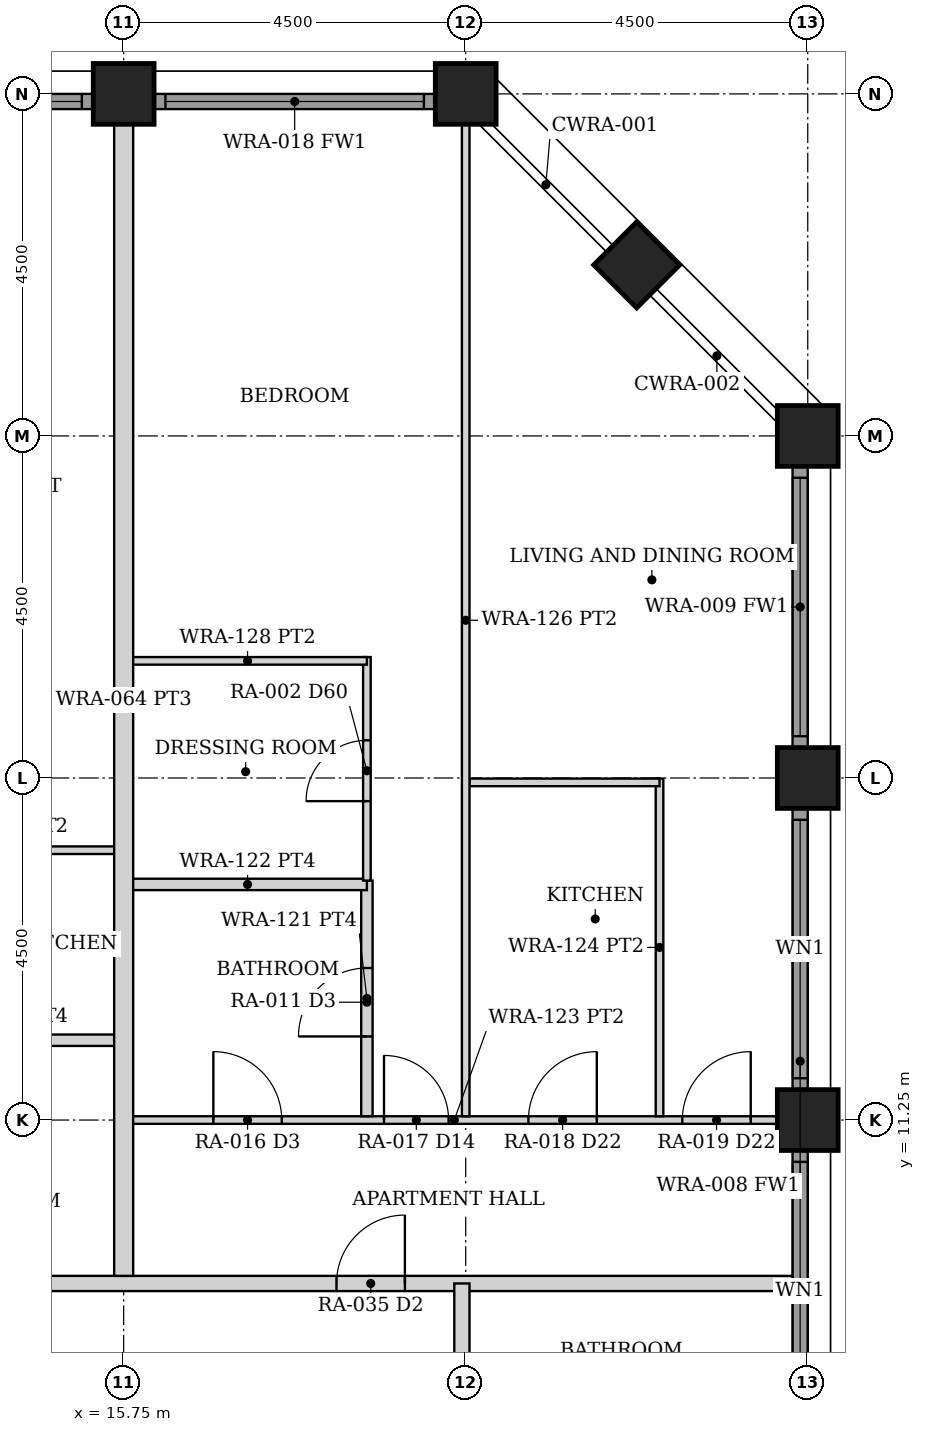
"""IFC4 building model, lengths in metres.
Left out: names, types, materials, properties, quantities, classifications, styles, units other than length and angle.
Written with IfcOpenShell. Run it as: python <this file> out.ifc"""

import sys

from ifc_helpers import new_model, si_unit, direction, frame, frame_2d, origin, origin_2d, place, context, subcontext, project, spatial, rectangle, hollow_rectangle, extrude, element, fill, save


model = new_model("IFC4")
c1 = context("Model", 3, precision=1e-05, world=origin(), true_north=direction((0.0, 1.0)))
c2 = subcontext(c1, "Body", "Model", "MODEL_VIEW")
j1 = project(units=[si_unit("LENGTHUNIT", "METRE"), si_unit("PLANEANGLEUNIT", "RADIAN")], contexts=[c1])
p1 = place(None, origin())
s1 = spatial("IfcSite", under=j1, at=p1, CompositionType="ELEMENT")
p2 = place(p1, origin())
s2 = spatial("IfcBuilding", under=s1, at=p2, CompositionType="ELEMENT")
p3 = place(p2, frame((0.0, 0.0, 30.0)))
s3 = spatial("IfcBuildingStorey", under=s2, at=p3, CompositionType="ELEMENT", Elevation=30.0)
for number, where, z_axis, x_axis in (
    (1, (24.75, 11.25, 0.0), (0.0, 0.0, 1.0), (1.0, 0.0, 0.0)),
    (2, (15.75, 24.75, 0.0), (0.0, 0.0, 1.0), (0.0, 1.0, 0.0)),
    (3, (24.75, 15.75, 0.0), (0.0, 0.0, 1.0), (1.0, 0.0, 0.0)),
    (4, (20.25, 24.75, 0.0), (0.0, 0.0, 1.0), (0.0, 1.0, 0.0)),
    (5, (24.75, 20.25, 0.0), (0.0, 0.0, 1.0), (1.0, 0.0, 0.0)),
    (6, (22.5, 22.5, 0.0), (0.0, 0.0, 1.0), (0.707, 0.707, 0.0)),
):
    element("IfcColumn", number, at=place(p3, frame(where, z_axis=z_axis, x_axis=x_axis)), inside=s3, PredefinedType="COLUMN", context=c2, shape_type="SweptSolid", body=[
        extrude(hollow_rectangle(XDim=0.8, YDim=0.8, WallThickness=0.08, at=origin_2d()), origin(), (0.0, 0.0, 1.0), 3.5),
    ])
p4 = place(p3, frame((24.65, 7.155, 0.0), z_axis=(0.0, 0.0, 1.0), x_axis=(0.0, 1.0, 0.0)))
e7 = element("IfcWall", 7, at=p4, inside=s3, PredefinedType="SOLIDWALL", context=c2, shape_type="SweptSolid", body=[
    extrude(rectangle(XDim=3.69, YDim=0.2, at=frame_2d((1.845, 0.0))), origin(), (0.0, 0.0, 1.0), 2.379),
])
p5 = place(p4, frame((0.145, 0.0, 0.3)))
e8 = element("IfcOpeningElement", 8, at=p5, cuts=e7, PredefinedType="OPENING", context=c2, shape_type="SweptSolid", body=[
    extrude(rectangle(XDim=3.4, YDim=1.929, at=frame_2d((1.7, 0.964))), frame((0.0, 0.11, 0.0), z_axis=(0.0, -1.0, 0.0), x_axis=(1.0, 0.0, 0.0)), (0.0, 0.0, 1.0), 0.22),
])
p6 = place(p3, frame((24.65, 11.655, 0.0), z_axis=(0.0, 0.0, 1.0), x_axis=(0.0, 1.0, 0.0)))
e9 = element("IfcWall", 9, at=p6, inside=s3, PredefinedType="SOLIDWALL", context=c2, shape_type="SweptSolid", body=[
    extrude(rectangle(XDim=3.69, YDim=0.2, at=frame_2d((1.845, 0.0))), origin(), (0.0, 0.0, 1.0), 2.379),
])
p7 = place(p6, frame((0.145, 0.0, 0.3)))
e10 = element("IfcOpeningElement", 10, at=p7, cuts=e9, PredefinedType="OPENING", context=c2, shape_type="SweptSolid", body=[
    extrude(rectangle(XDim=3.4, YDim=1.929, at=frame_2d((1.7, 0.964))), frame((0.0, 0.11, 0.0), z_axis=(0.0, -1.0, 0.0), x_axis=(1.0, 0.0, 0.0)), (0.0, 0.0, 1.0), 0.22),
])
p8 = place(p3, frame((24.65, 16.155, 0.0), z_axis=(0.0, 0.0, 1.0), x_axis=(0.0, 1.0, 0.0)))
e11 = element("IfcWall", 11, at=p8, inside=s3, PredefinedType="SOLIDWALL", context=c2, shape_type="SweptSolid", body=[
    extrude(rectangle(XDim=3.69, YDim=0.2, at=frame_2d((1.845, 0.0))), origin(), (0.0, 0.0, 1.0), 2.379),
])
p9 = place(p8, frame((0.145, 0.0, 0.3)))
e12 = element("IfcOpeningElement", 12, at=p9, cuts=e11, PredefinedType="OPENING", context=c2, shape_type="SweptSolid", body=[
    extrude(rectangle(XDim=3.4, YDim=1.929, at=frame_2d((1.7, 0.964))), frame((0.0, 0.11, 0.0), z_axis=(0.0, -1.0, 0.0), x_axis=(1.0, 0.0, 0.0)), (0.0, 0.0, 1.0), 0.22),
])
p10 = place(p3, frame((11.655, 24.65, 0.0), z_axis=(0.0, 0.0, 1.0), x_axis=(1.0, 0.0, 0.0)))
e13 = element("IfcWall", 13, at=p10, inside=s3, PredefinedType="SOLIDWALL", context=c2, shape_type="SweptSolid", body=[
    extrude(rectangle(XDim=3.69, YDim=0.2, at=frame_2d((1.845, 0.0))), origin(), (0.0, 0.0, 1.0), 2.379),
])
p11 = place(p10, frame((0.145, 0.0, 0.3)))
e14 = element("IfcOpeningElement", 14, at=p11, cuts=e13, PredefinedType="OPENING", context=c2, shape_type="SweptSolid", body=[
    extrude(rectangle(XDim=3.4, YDim=1.929, at=frame_2d((1.7, 0.964))), frame((0.0, 0.11, 0.0), z_axis=(0.0, -1.0, 0.0), x_axis=(1.0, 0.0, 0.0)), (0.0, 0.0, 1.0), 0.22),
])
p12 = place(p3, frame((16.155, 24.65, 0.0), z_axis=(0.0, 0.0, 1.0), x_axis=(1.0, 0.0, 0.0)))
e15 = element("IfcWall", 15, at=p12, inside=s3, PredefinedType="SOLIDWALL", context=c2, shape_type="SweptSolid", body=[
    extrude(rectangle(XDim=3.69, YDim=0.2, at=frame_2d((1.845, 0.0))), origin(), (0.0, 0.0, 1.0), 2.379),
])
p13 = place(p12, frame((0.145, 0.0, 0.3)))
e16 = element("IfcOpeningElement", 16, at=p13, cuts=e15, PredefinedType="OPENING", context=c2, shape_type="SweptSolid", body=[
    extrude(rectangle(XDim=3.4, YDim=1.929, at=frame_2d((1.7, 0.964))), frame((0.0, 0.11, 0.0), z_axis=(0.0, -1.0, 0.0), x_axis=(1.0, 0.0, 0.0)), (0.0, 0.0, 1.0), 0.22),
])
p14 = place(p3, frame((-24.55, 9.1, 0.0), z_axis=(0.0, 0.0, 1.0), x_axis=(1.0, 0.0, 0.0)))
e17 = element("IfcWall", 17, at=p14, inside=s3, PredefinedType="PARTITIONING", context=c2, shape_type="SweptSolid", body=[
    extrude(rectangle(XDim=49.1, YDim=0.2, at=frame_2d((24.55, 0.0))), origin(), (0.0, 0.0, 1.0), 2.373),
])
p15 = place(p14, frame((5.1, 0.0, 0.0)))
e18 = element("IfcOpeningElement", 18, at=p15, cuts=e17, PredefinedType="OPENING", context=c2, shape_type="SweptSolid", body=[
    extrude(rectangle(XDim=0.9, YDim=2.1, at=frame_2d((0.45, 1.05))), frame((0.0, 0.11, 0.0), z_axis=(0.0, -1.0, 0.0), x_axis=(1.0, 0.0, 0.0)), (0.0, 0.0, 1.0), 0.22),
])
p16 = place(p14, frame((9.0, 0.0, 0.0)))
e19 = element("IfcOpeningElement", 19, at=p16, cuts=e17, PredefinedType="OPENING", context=c2, shape_type="SweptSolid", body=[
    extrude(rectangle(XDim=0.9, YDim=2.1, at=frame_2d((0.45, 1.05))), frame((0.0, 0.11, 0.0), z_axis=(0.0, -1.0, 0.0), x_axis=(1.0, 0.0, 0.0)), (0.0, 0.0, 1.0), 0.22),
])
p17 = place(p14, frame((13.5, 0.0, 0.0)))
e20 = element("IfcOpeningElement", 20, at=p17, cuts=e17, PredefinedType="OPENING", context=c2, shape_type="SweptSolid", body=[
    extrude(rectangle(XDim=0.9, YDim=2.1, at=frame_2d((0.45, 1.05))), frame((0.0, 0.11, 0.0), z_axis=(0.0, -1.0, 0.0), x_axis=(1.0, 0.0, 0.0)), (0.0, 0.0, 1.0), 0.22),
])
p18 = place(p14, frame((18.0, 0.0, 0.0)))
e21 = element("IfcOpeningElement", 21, at=p18, cuts=e17, PredefinedType="OPENING", context=c2, shape_type="SweptSolid", body=[
    extrude(rectangle(XDim=0.9, YDim=2.1, at=frame_2d((0.45, 1.05))), frame((0.0, 0.11, 0.0), z_axis=(0.0, -1.0, 0.0), x_axis=(1.0, 0.0, 0.0)), (0.0, 0.0, 1.0), 0.22),
])
p19 = place(p14, frame((22.5, 0.0, 0.0)))
e22 = element("IfcOpeningElement", 22, at=p19, cuts=e17, PredefinedType="OPENING", context=c2, shape_type="SweptSolid", body=[
    extrude(rectangle(XDim=0.9, YDim=2.1, at=frame_2d((0.45, 1.05))), frame((0.0, 0.11, 0.0), z_axis=(0.0, -1.0, 0.0), x_axis=(1.0, 0.0, 0.0)), (0.0, 0.0, 1.0), 0.22),
])
p20 = place(p14, frame((27.0, 0.0, 0.0)))
e23 = element("IfcOpeningElement", 23, at=p20, cuts=e17, PredefinedType="OPENING", context=c2, shape_type="SweptSolid", body=[
    extrude(rectangle(XDim=0.9, YDim=2.1, at=frame_2d((0.45, 1.05))), frame((0.0, 0.11, 0.0), z_axis=(0.0, -1.0, 0.0), x_axis=(1.0, 0.0, 0.0)), (0.0, 0.0, 1.0), 0.22),
])
p21 = place(p14, frame((31.5, 0.0, 0.0)))
e24 = element("IfcOpeningElement", 24, at=p21, cuts=e17, PredefinedType="OPENING", context=c2, shape_type="SweptSolid", body=[
    extrude(rectangle(XDim=0.9, YDim=2.1, at=frame_2d((0.45, 1.05))), frame((0.0, 0.11, 0.0), z_axis=(0.0, -1.0, 0.0), x_axis=(1.0, 0.0, 0.0)), (0.0, 0.0, 1.0), 0.22),
])
p22 = place(p14, frame((36.0, 0.0, 0.0)))
e25 = element("IfcOpeningElement", 25, at=p22, cuts=e17, PredefinedType="OPENING", context=c2, shape_type="SweptSolid", body=[
    extrude(rectangle(XDim=0.9, YDim=2.1, at=frame_2d((0.45, 1.05))), frame((0.0, 0.11, 0.0), z_axis=(0.0, -1.0, 0.0), x_axis=(1.0, 0.0, 0.0)), (0.0, 0.0, 1.0), 0.22),
])
p23 = place(p14, frame((43.1, 0.0, 0.0)))
e26 = element("IfcOpeningElement", 26, at=p23, cuts=e17, PredefinedType="OPENING", context=c2, shape_type="SweptSolid", body=[
    extrude(rectangle(XDim=0.9, YDim=2.1, at=frame_2d((0.45, 1.05))), frame((0.0, 0.11, 0.0), z_axis=(0.0, -1.0, 0.0), x_axis=(1.0, 0.0, 0.0)), (0.0, 0.0, 1.0), 0.22),
])
p24 = place(p3, frame((20.2, -9.1, 0.0), z_axis=(0.0, 0.0, 1.0), x_axis=(0.0, 1.0, 0.0)))
e27 = element("IfcWall", 27, at=p24, inside=s3, PredefinedType="PARTITIONING", context=c2, shape_type="SweptSolid", body=[
    extrude(rectangle(XDim=18.2, YDim=0.2, at=frame_2d((9.1, 0.0))), origin(), (0.0, 0.0, 1.0), 2.373),
])
p25 = place(p24, frame((6.4, 0.0, 0.0)))
e28 = element("IfcOpeningElement", 28, at=p25, cuts=e27, PredefinedType="OPENING", context=c2, shape_type="SweptSolid", body=[
    extrude(rectangle(XDim=0.9, YDim=2.1, at=frame_2d((0.45, 1.05))), frame((0.0, 0.11, 0.0), z_axis=(0.0, -1.0, 0.0), x_axis=(1.0, 0.0, 0.0)), (0.0, 0.0, 1.0), 0.22),
])
p26 = place(p3, frame((12.6, 12.3, 0.0), z_axis=(0.0, 0.0, 1.0), x_axis=(1.0, 0.0, 0.0)))
e29 = element("IfcWall", 29, at=p26, inside=s3, PredefinedType="PARTITIONING", context=c2, shape_type="SweptSolid", body=[
    extrude(rectangle(XDim=3.05, YDim=0.15, at=frame_2d((1.525, 0.0))), origin(), (0.0, 0.0, 1.0), 2.373),
])
p27 = place(p3, frame((12.6, 14.8, 0.0), z_axis=(0.0, 0.0, 1.0), x_axis=(1.0, 0.0, 0.0)))
e30 = element("IfcWall", 30, at=p27, inside=s3, PredefinedType="PARTITIONING", context=c2, shape_type="SweptSolid", body=[
    extrude(rectangle(XDim=3.05, YDim=0.1, at=frame_2d((1.525, 0.0))), origin(), (0.0, 0.0, 1.0), 2.373),
])
p28 = place(p3, frame((15.85, 11.25, 0.0), z_axis=(0.0, 0.0, 1.0), x_axis=(1.0, 0.0, 0.0)))
e31 = element("IfcWall", 31, at=p28, inside=s3, PredefinedType="PARTITIONING", context=c2, shape_type="SweptSolid", body=[
    extrude(rectangle(XDim=8.5, YDim=0.1, at=frame_2d((4.25, 0.0))), origin(), (0.0, 0.0, 1.0), 2.373),
])
p29 = place(p28, frame((5.225, 0.0, 0.0)))
e32 = element("IfcOpeningElement", 32, at=p29, cuts=e31, PredefinedType="OPENING", context=c2, shape_type="SweptSolid", body=[
    extrude(rectangle(XDim=0.9, YDim=2.1, at=frame_2d((0.45, 1.05))), frame((0.0, 0.06, 0.0), z_axis=(0.0, -1.0, 0.0), x_axis=(1.0, 0.0, 0.0)), (0.0, 0.0, 1.0), 0.12),
])
p30 = place(p28, frame((7.25, 0.0, 0.0)))
e33 = element("IfcOpeningElement", 33, at=p30, cuts=e31, PredefinedType="OPENING", context=c2, shape_type="SweptSolid", body=[
    extrude(rectangle(XDim=0.9, YDim=2.1, at=frame_2d((0.45, 1.05))), frame((0.0, 0.06, 0.0), z_axis=(0.0, -1.0, 0.0), x_axis=(1.0, 0.0, 0.0)), (0.0, 0.0, 1.0), 0.12),
])
p31 = place(p28, frame((3.325, 0.0, 0.0)))
e34 = element("IfcOpeningElement", 34, at=p31, cuts=e31, PredefinedType="OPENING", context=c2, shape_type="SweptSolid", body=[
    extrude(rectangle(XDim=0.85, YDim=2.1, at=frame_2d((0.425, 1.05))), frame((0.0, 0.06, 0.0), z_axis=(0.0, -1.0, 0.0), x_axis=(1.0, 0.0, 0.0)), (0.0, 0.0, 1.0), 0.12),
])
p32 = place(p28, frame((1.08, 0.0, 0.0)))
e35 = element("IfcOpeningElement", 35, at=p32, cuts=e31, PredefinedType="OPENING", context=c2, shape_type="SweptSolid", body=[
    extrude(rectangle(XDim=0.9, YDim=2.1, at=frame_2d((0.45, 1.05))), frame((0.0, 0.06, 0.0), z_axis=(0.0, -1.0, 0.0), x_axis=(1.0, 0.0, 0.0)), (0.0, 0.0, 1.0), 0.12),
])
p33 = place(p3, frame((22.8, 11.3, 0.0), z_axis=(0.0, 0.0, 1.0), x_axis=(0.0, 1.0, 0.0)))
e36 = element("IfcWall", 36, at=p33, inside=s3, PredefinedType="PARTITIONING", context=c2, shape_type="SweptSolid", body=[
    extrude(rectangle(XDim=4.442, YDim=0.1, at=frame_2d((2.221, 0.0))), origin(), (0.0, 0.0, 1.0), 2.373),
])
p34 = place(p3, frame((20.3, 15.692, 0.0), z_axis=(0.0, 0.0, 1.0), x_axis=(1.0, 0.0, 0.0)))
e37 = element("IfcWall", 37, at=p34, inside=s3, PredefinedType="PARTITIONING", context=c2, shape_type="SweptSolid", body=[
    extrude(rectangle(XDim=2.5, YDim=0.1, at=frame_2d((1.25, 0.0))), origin(), (0.0, 0.0, 1.0), 2.373),
])
p35 = place(p3, frame((20.25, 11.3, 0.0), z_axis=(0.0, 0.0, 1.0), x_axis=(0.0, 1.0, 0.0)))
e38 = element("IfcWall", 38, at=p35, inside=s3, PredefinedType="PARTITIONING", context=c2, shape_type="SweptSolid", body=[
    extrude(rectangle(XDim=13.05, YDim=0.1, at=frame_2d((6.525, 0.0))), origin(), (0.0, 0.0, 1.0), 2.373),
])
p36 = place(p3, frame((18.95, 11.3, 0.0), z_axis=(0.0, 0.0, 1.0), x_axis=(0.0, 1.0, 0.0)))
e39 = element("IfcWall", 39, at=p36, inside=s3, PredefinedType="PARTITIONING", context=c2, shape_type="SweptSolid", body=[
    extrude(rectangle(XDim=3.1, YDim=0.15, at=frame_2d((1.55, 0.0))), origin(), (0.0, 0.0, 1.0), 2.373),
])
p37 = place(p36, frame((1.05, 0.0, 0.0)))
e40 = element("IfcOpeningElement", 40, at=p37, cuts=e39, PredefinedType="OPENING", context=c2, shape_type="SweptSolid", body=[
    extrude(rectangle(XDim=0.9, YDim=2.1, at=frame_2d((0.45, 1.05))), frame((0.0, 0.085, 0.0), z_axis=(0.0, -1.0, 0.0), x_axis=(1.0, 0.0, 0.0)), (0.0, 0.0, 1.0), 0.17),
])
p38 = place(p3, frame((15.81, 14.35, 0.0), z_axis=(0.0, 0.0, 1.0), x_axis=(1.0, 0.0, 0.0)))
e41 = element("IfcWall", 41, at=p38, inside=s3, PredefinedType="PARTITIONING", context=c2, shape_type="SweptSolid", body=[
    extrude(rectangle(XDim=3.14, YDim=0.15, at=frame_2d((1.57, 0.0))), origin(), (0.0, 0.0, 1.0), 2.373),
])
p39 = place(p3, frame((18.95, 14.4, 0.0), z_axis=(0.0, 0.0, 1.0), x_axis=(0.0, 1.0, 0.0)))
e42 = element("IfcWall", 42, at=p39, inside=s3, PredefinedType="PARTITIONING", context=c2, shape_type="SweptSolid", body=[
    extrude(rectangle(XDim=2.941, YDim=0.1, at=frame_2d((1.47, 0.0))), origin(), (0.0, 0.0, 1.0), 2.373),
])
p40 = place(p39, frame((1.045, 0.0, 0.0)))
e43 = element("IfcOpeningElement", 43, at=p40, cuts=e42, PredefinedType="OPENING", context=c2, shape_type="SweptSolid", body=[
    extrude(rectangle(XDim=0.8, YDim=2.1, at=frame_2d((0.4, 1.05))), frame((0.0, 0.06, 0.0), z_axis=(0.0, -1.0, 0.0), x_axis=(1.0, 0.0, 0.0)), (0.0, 0.0, 1.0), 0.12),
])
p41 = place(p3, frame((15.81, 17.291, 0.0), z_axis=(0.0, 0.0, 1.0), x_axis=(1.0, 0.0, 0.0)))
e44 = element("IfcWall", 44, at=p41, inside=s3, PredefinedType="PARTITIONING", context=c2, shape_type="SweptSolid", body=[
    extrude(rectangle(XDim=3.14, YDim=0.1, at=frame_2d((1.57, 0.0))), origin(), (0.0, 0.0, 1.0), 2.373),
])
p42 = place(p3, frame((15.75, 9.2, 0.0), z_axis=(0.0, 0.0, 1.0), x_axis=(0.0, 1.0, 0.0)))
e45 = element("IfcWall", 45, at=p42, inside=s3, PredefinedType="PARTITIONING", context=c2, shape_type="SweptSolid", body=[
    extrude(rectangle(XDim=15.15, YDim=0.25, at=frame_2d((7.575, 0.0))), origin(), (0.0, 0.0, 1.0), 2.373),
])
p43 = place(p5, origin())
e46 = element("IfcWindow", 46, at=p43, inside=s3, PartitioningType="SINGLE_PANEL", PredefinedType="WINDOW", context=c2, shape_type="SweptSolid", body=[
    extrude(rectangle(XDim=3.4, YDim=1.929, at=frame_2d((1.7, 0.964))), frame((0.0, 0.03, 0.0), z_axis=(0.0, -1.0, 0.0), x_axis=(1.0, 0.0, 0.0)), (0.0, 0.0, 1.0), 0.06),
])
fill(e8, e46)
p44 = place(p7, origin())
e47 = element("IfcWindow", 47, at=p44, inside=s3, PartitioningType="SINGLE_PANEL", PredefinedType="WINDOW", context=c2, shape_type="SweptSolid", body=[
    extrude(rectangle(XDim=3.4, YDim=1.929, at=frame_2d((1.7, 0.964))), frame((0.0, 0.03, 0.0), z_axis=(0.0, -1.0, 0.0), x_axis=(1.0, 0.0, 0.0)), (0.0, 0.0, 1.0), 0.06),
])
fill(e10, e47)
p45 = place(p9, origin())
e48 = element("IfcWindow", 48, at=p45, inside=s3, PartitioningType="SINGLE_PANEL", PredefinedType="WINDOW", context=c2, shape_type="SweptSolid", body=[
    extrude(rectangle(XDim=3.4, YDim=1.929, at=frame_2d((1.7, 0.964))), frame((0.0, 0.03, 0.0), z_axis=(0.0, -1.0, 0.0), x_axis=(1.0, 0.0, 0.0)), (0.0, 0.0, 1.0), 0.06),
])
fill(e12, e48)
p46 = place(p11, origin())
e49 = element("IfcWindow", 49, at=p46, inside=s3, PartitioningType="SINGLE_PANEL", PredefinedType="WINDOW", context=c2, shape_type="SweptSolid", body=[
    extrude(rectangle(XDim=3.4, YDim=1.929, at=frame_2d((1.7, 0.964))), frame((0.0, 0.03, 0.0), z_axis=(0.0, -1.0, 0.0), x_axis=(1.0, 0.0, 0.0)), (0.0, 0.0, 1.0), 0.06),
])
fill(e14, e49)
p47 = place(p13, origin())
e50 = element("IfcWindow", 50, at=p47, inside=s3, PartitioningType="SINGLE_PANEL", PredefinedType="WINDOW", context=c2, shape_type="SweptSolid", body=[
    extrude(rectangle(XDim=3.4, YDim=1.929, at=frame_2d((1.7, 0.964))), frame((0.0, 0.03, 0.0), z_axis=(0.0, -1.0, 0.0), x_axis=(1.0, 0.0, 0.0)), (0.0, 0.0, 1.0), 0.06),
])
fill(e16, e50)
p48 = place(p23, origin())
e51 = element("IfcDoor", 51, at=p48, inside=s3, OperationType="SINGLE_SWING_RIGHT", PredefinedType="DOOR", context=c2, shape_type="SweptSolid", body=[
    extrude(rectangle(XDim=0.9, YDim=2.1, at=frame_2d((0.45, 1.05))), frame((0.0, 0.025, 0.0), z_axis=(0.0, -1.0, 0.0), x_axis=(1.0, 0.0, 0.0)), (0.0, 0.0, 1.0), 0.05),
])
fill(e26, e51)
p49 = place(p29, origin())
e52 = element("IfcDoor", 52, at=p49, inside=s3, OperationType="SINGLE_SWING_RIGHT", PredefinedType="DOOR", context=c2, shape_type="SweptSolid", body=[
    extrude(rectangle(XDim=0.9, YDim=2.1, at=frame_2d((0.45, 1.05))), frame((0.0, 0.025, 0.0), z_axis=(0.0, -1.0, 0.0), x_axis=(1.0, 0.0, 0.0)), (0.0, 0.0, 1.0), 0.05),
])
fill(e32, e52)
p50 = place(p30, origin())
e53 = element("IfcDoor", 53, at=p50, inside=s3, OperationType="SINGLE_SWING_RIGHT", PredefinedType="DOOR", context=c2, shape_type="SweptSolid", body=[
    extrude(rectangle(XDim=0.9, YDim=2.1, at=frame_2d((0.45, 1.05))), frame((0.0, 0.025, 0.0), z_axis=(0.0, -1.0, 0.0), x_axis=(1.0, 0.0, 0.0)), (0.0, 0.0, 1.0), 0.05),
])
fill(e33, e53)
p51 = place(p31, origin())
e54 = element("IfcDoor", 54, at=p51, inside=s3, OperationType="SINGLE_SWING_LEFT", PredefinedType="DOOR", context=c2, shape_type="SweptSolid", body=[
    extrude(rectangle(XDim=0.85, YDim=2.1, at=frame_2d((0.425, 1.05))), frame((0.0, 0.025, 0.0), z_axis=(0.0, -1.0, 0.0), x_axis=(1.0, 0.0, 0.0)), (0.0, 0.0, 1.0), 0.05),
])
fill(e34, e54)
p52 = place(p37, origin())
e55 = element("IfcDoor", 55, at=p52, inside=s3, OperationType="SINGLE_SWING_LEFT", PredefinedType="DOOR", context=c2, shape_type="SweptSolid", body=[
    extrude(rectangle(XDim=0.9, YDim=2.1, at=frame_2d((0.45, 1.05))), frame((0.0, 0.025, 0.0), z_axis=(0.0, -1.0, 0.0), x_axis=(1.0, 0.0, 0.0)), (0.0, 0.0, 1.0), 0.05),
])
fill(e40, e55)
p53 = place(p32, origin())
e56 = element("IfcDoor", 56, at=p53, inside=s3, OperationType="SINGLE_SWING_LEFT", PredefinedType="DOOR", context=c2, shape_type="SweptSolid", body=[
    extrude(rectangle(XDim=0.9, YDim=2.1, at=frame_2d((0.45, 1.05))), frame((0.0, 0.025, 0.0), z_axis=(0.0, -1.0, 0.0), x_axis=(1.0, 0.0, 0.0)), (0.0, 0.0, 1.0), 0.05),
])
fill(e35, e56)
p54 = place(p40, origin())
e57 = element("IfcDoor", 57, at=p54, inside=s3, OperationType="SINGLE_SWING_LEFT", PredefinedType="DOOR", context=c2, shape_type="SweptSolid", body=[
    extrude(rectangle(XDim=0.8, YDim=2.1, at=frame_2d((0.4, 1.05))), frame((0.0, 0.025, 0.0), z_axis=(0.0, -1.0, 0.0), x_axis=(1.0, 0.0, 0.0)), (0.0, 0.0, 1.0), 0.05),
])
fill(e43, e57)
save(model, sys.argv[1])
